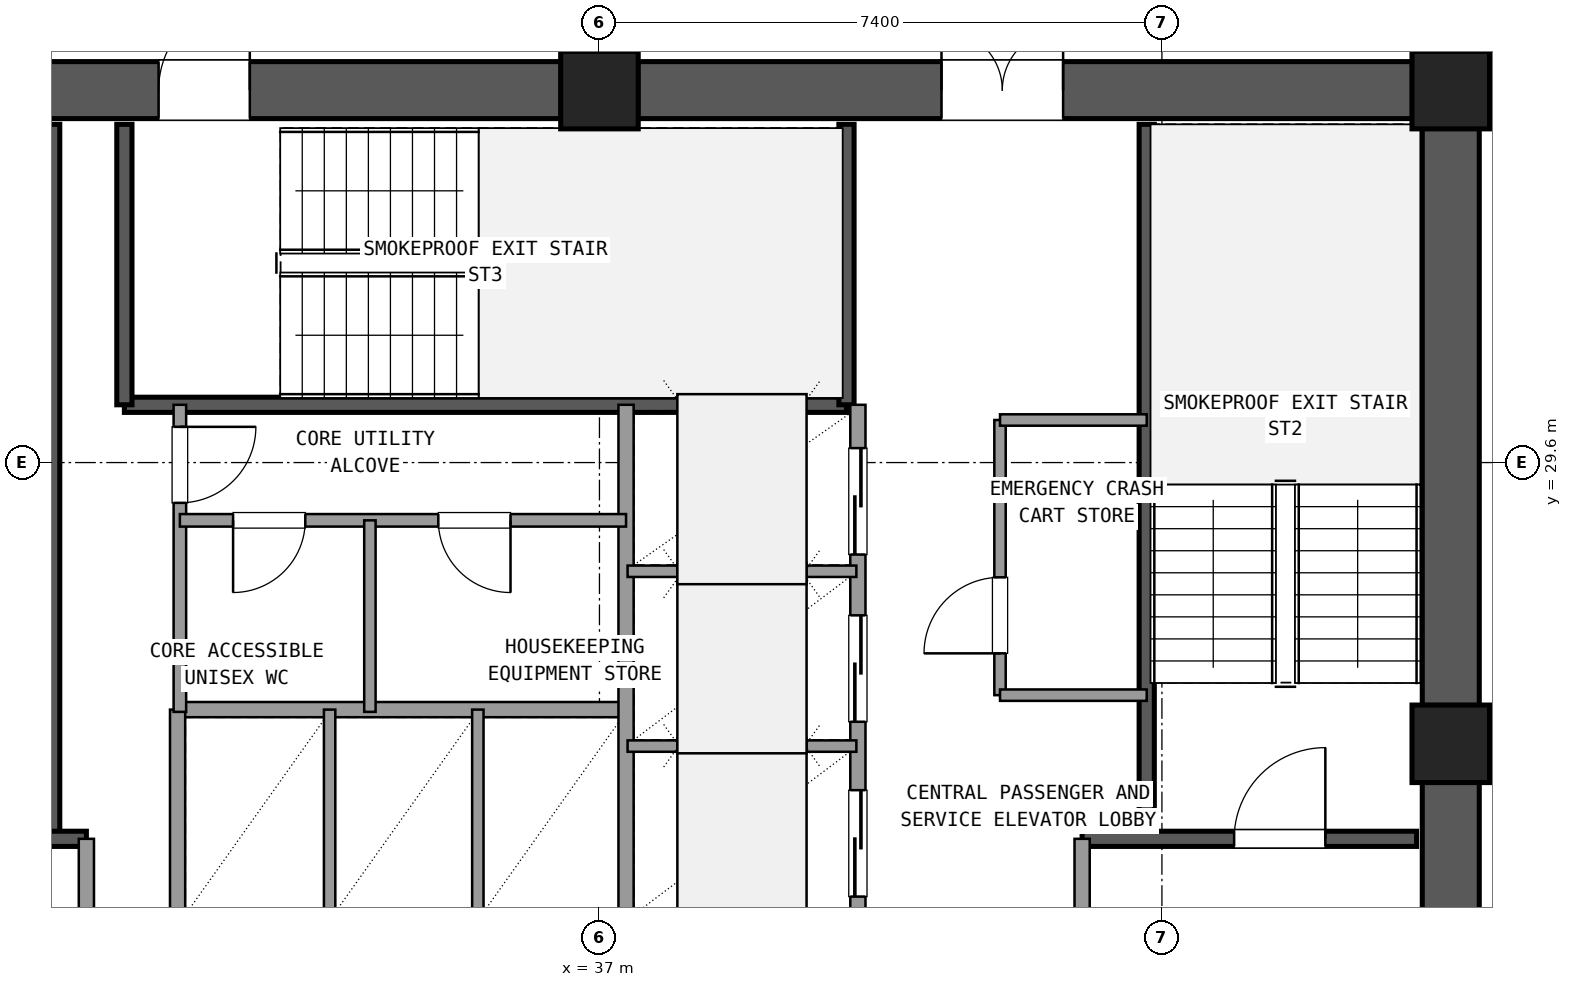
"""IFC4 building model, lengths in metres.
Left out: names, types, materials, properties, quantities, classifications, styles, units other than length and angle.
Written with IfcOpenShell. Run it as: python <this file> out.ifc"""

import sys

from ifc_helpers import new_model, si_unit, direction, frame, frame_2d, origin, origin_2d, place, context, subcontext, project, spatial, rectangle, extrude, element, fill, save


model = new_model("IFC4")
c1 = context("Model", 3, precision=1e-05, world=origin(), true_north=direction((0.0, 1.0)))
c2 = subcontext(c1, "Body", "Model", "MODEL_VIEW")
j1 = project(units=[si_unit("LENGTHUNIT", "METRE"), si_unit("PLANEANGLEUNIT", "RADIAN")], contexts=[c1])
p1 = place(None, origin())
s1 = spatial("IfcSite", under=j1, at=p1, CompositionType="ELEMENT")
p2 = place(p1, origin())
s2 = spatial("IfcBuilding", under=s1, at=p2, CompositionType="ELEMENT")
p3 = place(p2, frame((0.0, 0.0, 156.42)))
s3 = spatial("IfcBuildingStorey", under=s2, at=p3, CompositionType="ELEMENT", Elevation=156.42)
for number, where, z_axis, x_axis in (
    (1, (48.2, 25.9, 0.0), (0.0, 0.0, 1.0), (1.0, 0.0, 0.0)),
    (2, (48.2, 34.5, 0.0), (0.0, 0.0, 1.0), (1.0, 0.0, 0.0)),
    (3, (37.0, 34.5, 0.0), (0.0, 0.0, 1.0), (1.0, 0.0, 0.0)),
):
    element("IfcColumn", number, at=place(p3, frame(where, z_axis=z_axis, x_axis=x_axis)), inside=s3, PredefinedType="COLUMN", context=c2, shape_type="SweptSolid", body=[
        extrude(rectangle(XDim=1.02, YDim=1.02, at=origin_2d()), origin(), (0.0, 0.0, 1.0), 3.6),
    ])
p4 = place(p3, frame((48.2, 17.805, 0.0), z_axis=(0.0, 0.0, 1.0), x_axis=(0.0, 1.0, 0.0)))
e4 = element("IfcWall", 4, at=p4, inside=s3, PredefinedType="SHEAR", context=c2, shape_type="SweptSolid", body=[
    extrude(rectangle(XDim=7.59, YDim=0.75, at=frame_2d((3.795, 0.0))), origin(), (0.0, 0.0, 1.0), 3.32),
])
p5 = place(p4, frame((4.245, 0.0, 0.0)))
e5 = element("IfcOpeningElement", 5, at=p5, cuts=e4, PredefinedType="OPENING", context=c2, shape_type="SweptSolid", body=[
    extrude(rectangle(XDim=1.2, YDim=2.15, at=frame_2d((0.6, 1.075))), frame((0.0, 0.385, 0.0), z_axis=(0.0, -1.0, 0.0), x_axis=(1.0, 0.0, 0.0)), (0.0, 0.0, 1.0), 0.77),
])
p6 = place(p3, frame((48.2, 26.405, 0.0), z_axis=(0.0, 0.0, 1.0), x_axis=(0.0, 1.0, 0.0)))
e6 = element("IfcWall", 6, at=p6, inside=s3, PredefinedType="SHEAR", context=c2, shape_type="SweptSolid", body=[
    extrude(rectangle(XDim=7.59, YDim=0.75, at=frame_2d((3.795, 0.0))), origin(), (0.0, 0.0, 1.0), 3.32),
])
p7 = place(p3, frame((47.695, 34.5, 0.0), z_axis=(0.0, 0.0, 1.0), x_axis=(-1.0, 0.0, 0.0)))
e7 = element("IfcWall", 7, at=p7, inside=s3, PredefinedType="SHEAR", context=c2, shape_type="SweptSolid", body=[
    extrude(rectangle(XDim=10.19, YDim=0.75, at=frame_2d((5.095, 0.0))), origin(), (0.0, 0.0, 1.0), 3.32),
])
p8 = place(p7, frame((4.595, 0.0, 0.0)))
e8 = element("IfcOpeningElement", 8, at=p8, cuts=e7, PredefinedType="OPENING", context=c2, shape_type="SweptSolid", body=[
    extrude(rectangle(XDim=1.6, YDim=2.2, at=frame_2d((0.8, 1.1))), frame((0.0, 0.385, 0.0), z_axis=(0.0, -1.0, 0.0), x_axis=(1.0, 0.0, 0.0)), (0.0, 0.0, 1.0), 0.77),
])
p9 = place(p3, frame((36.495, 34.5, 0.0), z_axis=(0.0, 0.0, 1.0), x_axis=(-1.0, 0.0, 0.0)))
e9 = element("IfcWall", 9, at=p9, inside=s3, PredefinedType="SHEAR", context=c2, shape_type="SweptSolid", body=[
    extrude(rectangle(XDim=10.19, YDim=0.75, at=frame_2d((5.095, 0.0))), origin(), (0.0, 0.0, 1.0), 3.32),
])
p10 = place(p9, frame((4.095, 0.0, 0.0)))
e10 = element("IfcOpeningElement", 10, at=p10, cuts=e9, PredefinedType="OPENING", context=c2, shape_type="SweptSolid", body=[
    extrude(rectangle(XDim=1.2, YDim=2.15, at=frame_2d((0.6, 1.075))), frame((0.0, 0.385, 0.0), z_axis=(0.0, -1.0, 0.0), x_axis=(1.0, 0.0, 0.0)), (0.0, 0.0, 1.0), 0.77),
])
p11 = place(p3, frame((29.8, 24.65, 0.0), z_axis=(0.0, 0.0, 1.0), x_axis=(0.0, 1.0, 0.0)))
e11 = element("IfcWall", 11, at=p11, inside=s3, PredefinedType="SHEAR", context=c2, shape_type="SweptSolid", body=[
    extrude(rectangle(XDim=9.4, YDim=0.2, at=frame_2d((4.7, 0.0))), origin(), (0.0, 0.0, 1.0), 3.32),
])
p12 = place(p3, frame((26.25, 24.65, 0.0), z_axis=(0.0, 0.0, 1.0), x_axis=(1.0, 0.0, 0.0)))
e12 = element("IfcWall", 12, at=p12, inside=s3, PredefinedType="SHEAR", context=c2, shape_type="SweptSolid", body=[
    extrude(rectangle(XDim=4.0, YDim=0.2, at=frame_2d((2.0, 0.0))), origin(), (0.0, 0.0, 1.0), 3.32),
])
p13 = place(p12, frame((1.0, 0.0, 0.0)))
e13 = element("IfcOpeningElement", 13, at=p13, cuts=e12, PredefinedType="OPENING", context=c2, shape_type="SweptSolid", body=[
    extrude(rectangle(XDim=1.2, YDim=2.15, at=frame_2d((0.6, 1.075))), frame((0.0, 0.11, 0.0), z_axis=(0.0, -1.0, 0.0), x_axis=(1.0, 0.0, 0.0)), (0.0, 0.0, 1.0), 0.22),
])
p14 = place(p3, frame((44.2, 24.65, 0.0), z_axis=(0.0, 0.0, 1.0), x_axis=(0.0, 1.0, 0.0)))
e14 = element("IfcWall", 14, at=p14, inside=s3, PredefinedType="SHEAR", context=c2, shape_type="SweptSolid", body=[
    extrude(rectangle(XDim=9.4, YDim=0.2, at=frame_2d((4.7, 0.0))), origin(), (0.0, 0.0, 1.0), 3.32),
])
p15 = place(p3, frame((43.35, 24.65, 0.0), z_axis=(0.0, 0.0, 1.0), x_axis=(1.0, 0.0, 0.0)))
e15 = element("IfcWall", 15, at=p15, inside=s3, PredefinedType="SHEAR", context=c2, shape_type="SweptSolid", body=[
    extrude(rectangle(XDim=4.4, YDim=0.2, at=frame_2d((2.2, 0.0))), origin(), (0.0, 0.0, 1.0), 3.32),
])
p16 = place(p15, frame((2.0, 0.0, 0.0)))
e16 = element("IfcOpeningElement", 16, at=p16, cuts=e15, PredefinedType="OPENING", context=c2, shape_type="SweptSolid", body=[
    extrude(rectangle(XDim=1.2, YDim=2.15, at=frame_2d((0.6, 1.075))), frame((0.0, 0.11, 0.0), z_axis=(0.0, -1.0, 0.0), x_axis=(1.0, 0.0, 0.0)), (0.0, 0.0, 1.0), 0.22),
])
p17 = place(p3, frame((30.75, 30.36, 0.0), z_axis=(0.0, 0.0, 1.0), x_axis=(1.0, 0.0, 0.0)))
e17 = element("IfcWall", 17, at=p17, inside=s3, PredefinedType="SHEAR", context=c2, shape_type="SweptSolid", body=[
    extrude(rectangle(XDim=9.5, YDim=0.2, at=frame_2d((4.75, 0.0))), origin(), (0.0, 0.0, 1.0), 3.32),
])
for number, where, z_axis, x_axis in (
    (18, (30.75, 30.36, 0.0), (0.0, 0.0, 1.0), (0.0, 1.0, 0.0)),
    (19, (40.25, 30.36, 0.0), (0.0, 0.0, 1.0), (0.0, 1.0, 0.0)),
):
    element("IfcWall", number, at=place(p3, frame(where, z_axis=z_axis, x_axis=x_axis)), inside=s3, PredefinedType="SHEAR", context=c2, shape_type="SweptSolid", body=[
        extrude(rectangle(XDim=3.69, YDim=0.2, at=frame_2d((1.845, 0.0))), origin(), (0.0, 0.0, 1.0), 3.32),
    ])
p18 = place(p3, frame((30.25, 17.75, 0.0), z_axis=(0.0, 0.0, 1.0), x_axis=(0.0, 1.0, 0.0)))
e20 = element("IfcWall", 20, at=p18, inside=s3, PredefinedType="SOLIDWALL", context=c2, shape_type="SweptSolid", body=[
    extrude(rectangle(XDim=6.9, YDim=0.2, at=frame_2d((3.45, 0.0))), origin(), (0.0, 0.0, 1.0), 2.61),
])
p19 = place(p18, frame((4.15, 0.0, 0.0)))
e21 = element("IfcOpeningElement", 21, at=p19, cuts=e20, PredefinedType="OPENING", context=c2, shape_type="SweptSolid", body=[
    extrude(rectangle(XDim=1.2, YDim=2.15, at=frame_2d((0.6, 1.075))), frame((0.0, 0.11, 0.0), z_axis=(0.0, -1.0, 0.0), x_axis=(1.0, 0.0, 0.0)), (0.0, 0.0, 1.0), 0.22),
])
p20 = place(p3, frame((43.35, 17.75, 0.0), z_axis=(0.0, 0.0, 1.0), x_axis=(0.0, 1.0, 0.0)))
e22 = element("IfcWall", 22, at=p20, inside=s3, PredefinedType="SOLIDWALL", context=c2, shape_type="SweptSolid", body=[
    extrude(rectangle(XDim=6.9, YDim=0.2, at=frame_2d((3.45, 0.0))), origin(), (0.0, 0.0, 1.0), 2.61),
])
p21 = place(p20, frame((4.15, 0.0, 0.0)))
e23 = element("IfcOpeningElement", 23, at=p21, cuts=e22, PredefinedType="OPENING", context=c2, shape_type="SweptSolid", body=[
    extrude(rectangle(XDim=1.2, YDim=2.15, at=frame_2d((0.6, 1.075))), frame((0.0, 0.11, 0.0), z_axis=(0.0, -1.0, 0.0), x_axis=(1.0, 0.0, 0.0)), (0.0, 0.0, 1.0), 0.22),
])
p22 = place(p3, frame((31.45, 26.35, 0.0), z_axis=(0.0, 0.0, 1.0), x_axis=(1.0, 0.0, 0.0)))
e24 = element("IfcWall", 24, at=p22, inside=s3, PredefinedType="SOLIDWALL", context=c2, shape_type="SweptSolid", body=[
    extrude(rectangle(XDim=5.9, YDim=0.2, at=frame_2d((2.95, 0.0))), origin(), (0.0, 0.0, 1.0), 2.61),
])
p23 = place(p3, frame((31.45, 23.54, 0.0), z_axis=(0.0, 0.0, 1.0), x_axis=(0.0, 1.0, 0.0)))
e25 = element("IfcWall", 25, at=p23, inside=s3, PredefinedType="SOLIDWALL", context=c2, shape_type="SweptSolid", body=[
    extrude(rectangle(XDim=2.81, YDim=0.2, at=frame_2d((1.405, 0.0))), origin(), (0.0, 0.0, 1.0), 2.61),
])
for number, where, z_axis, x_axis in (
    (26, (33.45, 23.54, 0.0), (0.0, 0.0, 1.0), (0.0, 1.0, 0.0)),
    (27, (35.4, 23.54, 0.0), (0.0, 0.0, 1.0), (0.0, 1.0, 0.0)),
):
    element("IfcWall", number, at=place(p3, frame(where, z_axis=z_axis, x_axis=x_axis)), inside=s3, PredefinedType="PARTITIONING", context=c2, shape_type="SweptSolid", body=[
        extrude(rectangle(XDim=2.81, YDim=0.15, at=frame_2d((1.405, 0.0))), origin(), (0.0, 0.0, 1.0), 2.61),
    ])
p24 = place(p3, frame((37.35, 23.54, 0.0), z_axis=(0.0, 0.0, 1.0), x_axis=(0.0, 1.0, 0.0)))
e28 = element("IfcWall", 28, at=p24, inside=s3, PredefinedType="SOLIDWALL", context=c2, shape_type="SweptSolid", body=[
    extrude(rectangle(XDim=6.82, YDim=0.2, at=frame_2d((3.41, 0.0))), origin(), (0.0, 0.0, 1.0), 2.61),
])
p25 = place(p3, frame((40.4, 23.54, 0.0), z_axis=(0.0, 0.0, 1.0), x_axis=(0.0, 1.0, 0.0)))
e29 = element("IfcWall", 29, at=p25, inside=s3, PredefinedType="SOLIDWALL", context=c2, shape_type="SweptSolid", body=[
    extrude(rectangle(XDim=6.82, YDim=0.2, at=frame_2d((3.41, 0.0))), origin(), (0.0, 0.0, 1.0), 2.61),
])
p26 = place(p25, frame((0.35, 0.0, 0.0)))
e30 = element("IfcOpeningElement", 30, at=p26, cuts=e29, PredefinedType="OPENING", context=c2, shape_type="SweptSolid", body=[
    extrude(rectangle(XDim=1.4, YDim=2.2, at=frame_2d((0.7, 1.1))), frame((0.0, 0.11, 0.0), z_axis=(0.0, -1.0, 0.0), x_axis=(1.0, 0.0, 0.0)), (0.0, 0.0, 1.0), 0.22),
])
p27 = place(p25, frame((2.65, 0.0, 0.0)))
e31 = element("IfcOpeningElement", 31, at=p27, cuts=e29, PredefinedType="OPENING", context=c2, shape_type="SweptSolid", body=[
    extrude(rectangle(XDim=1.4, YDim=2.2, at=frame_2d((0.7, 1.1))), frame((0.0, 0.11, 0.0), z_axis=(0.0, -1.0, 0.0), x_axis=(1.0, 0.0, 0.0)), (0.0, 0.0, 1.0), 0.22),
])
p28 = place(p25, frame((4.85, 0.0, 0.0)))
e32 = element("IfcOpeningElement", 32, at=p28, cuts=e29, PredefinedType="OPENING", context=c2, shape_type="SweptSolid", body=[
    extrude(rectangle(XDim=1.4, YDim=2.2, at=frame_2d((0.7, 1.1))), frame((0.0, 0.11, 0.0), z_axis=(0.0, -1.0, 0.0), x_axis=(1.0, 0.0, 0.0)), (0.0, 0.0, 1.0), 0.22),
])
for number, where, z_axis, x_axis in (
    (33, (37.37, 25.87, 0.0), (0.0, 0.0, 1.0), (1.0, 0.0, 0.0)),
    (34, (37.37, 28.17, 0.0), (0.0, 0.0, 1.0), (1.0, 0.0, 0.0)),
):
    element("IfcWall", number, at=place(p3, frame(where, z_axis=z_axis, x_axis=x_axis)), inside=s3, PredefinedType="PARTITIONING", context=c2, shape_type="SweptSolid", body=[
        extrude(rectangle(XDim=3.01, YDim=0.15, at=frame_2d((1.505, 0.0))), origin(), (0.0, 0.0, 1.0), 2.61),
    ])
p29 = place(p3, frame((42.27, 26.54, 0.0), z_axis=(0.0, 0.0, 1.0), x_axis=(0.0, 1.0, 0.0)))
e35 = element("IfcWall", 35, at=p29, inside=s3, PredefinedType="PARTITIONING", context=c2, shape_type="SweptSolid", body=[
    extrude(rectangle(XDim=3.62, YDim=0.15, at=frame_2d((1.81, 0.0))), origin(), (0.0, 0.0, 1.0), 2.61),
])
p30 = place(p29, frame((0.55, 0.0, 0.0)))
e36 = element("IfcOpeningElement", 36, at=p30, cuts=e35, PredefinedType="OPENING", context=c2, shape_type="SweptSolid", body=[
    extrude(rectangle(XDim=1.0, YDim=2.15, at=frame_2d((0.5, 1.075))), frame((0.0, 0.085, 0.0), z_axis=(0.0, -1.0, 0.0), x_axis=(1.0, 0.0, 0.0)), (0.0, 0.0, 1.0), 0.17),
])
for number, where, z_axis, x_axis in (
    (37, (42.27, 26.54, 0.0), (0.0, 0.0, 1.0), (1.0, 0.0, 0.0)),
    (38, (42.27, 30.16, 0.0), (0.0, 0.0, 1.0), (1.0, 0.0, 0.0)),
):
    element("IfcWall", number, at=place(p3, frame(where, z_axis=z_axis, x_axis=x_axis)), inside=s3, PredefinedType="PARTITIONING", context=c2, shape_type="SweptSolid", body=[
        extrude(rectangle(XDim=1.93, YDim=0.15, at=frame_2d((0.965, 0.0))), origin(), (0.0, 0.0, 1.0), 2.61),
    ])
p31 = place(p3, frame((31.48, 26.32, 0.0), z_axis=(0.0, 0.0, 1.0), x_axis=(0.0, 1.0, 0.0)))
e39 = element("IfcWall", 39, at=p31, inside=s3, PredefinedType="PLUMBINGWALL", context=c2, shape_type="SweptSolid", body=[
    extrude(rectangle(XDim=4.04, YDim=0.165, at=frame_2d((2.02, 0.0))), origin(), (0.0, 0.0, 1.0), 2.61),
])
p32 = place(p31, frame((2.75, 0.0, 0.0)))
e40 = element("IfcOpeningElement", 40, at=p32, cuts=e39, PredefinedType="OPENING", context=c2, shape_type="SweptSolid", body=[
    extrude(rectangle(XDim=1.0, YDim=2.15, at=frame_2d((0.5, 1.075))), frame((0.0, 0.093, 0.0), z_axis=(0.0, -1.0, 0.0), x_axis=(1.0, 0.0, 0.0)), (0.0, 0.0, 1.0), 0.185),
])
p33 = place(p3, frame((31.48, 28.84, 0.0), z_axis=(0.0, 0.0, 1.0), x_axis=(1.0, 0.0, 0.0)))
e41 = element("IfcWall", 41, at=p33, inside=s3, PredefinedType="PLUMBINGWALL", context=c2, shape_type="SweptSolid", body=[
    extrude(rectangle(XDim=5.87, YDim=0.165, at=frame_2d((2.935, 0.0))), origin(), (0.0, 0.0, 1.0), 2.61),
])
p34 = place(p33, frame((0.7, 0.0, 0.0)))
e42 = element("IfcOpeningElement", 42, at=p34, cuts=e41, PredefinedType="OPENING", context=c2, shape_type="SweptSolid", body=[
    extrude(rectangle(XDim=0.95, YDim=2.1, at=frame_2d((0.475, 1.05))), frame((0.0, 0.093, 0.0), z_axis=(0.0, -1.0, 0.0), x_axis=(1.0, 0.0, 0.0)), (0.0, 0.0, 1.0), 0.185),
])
p35 = place(p33, frame((3.4, 0.0, 0.0)))
e43 = element("IfcOpeningElement", 43, at=p35, cuts=e41, PredefinedType="OPENING", context=c2, shape_type="SweptSolid", body=[
    extrude(rectangle(XDim=0.95, YDim=2.1, at=frame_2d((0.475, 1.05))), frame((0.0, 0.093, 0.0), z_axis=(0.0, -1.0, 0.0), x_axis=(1.0, 0.0, 0.0)), (0.0, 0.0, 1.0), 0.185),
])
p36 = place(p3, frame((33.98, 26.32, 0.0), z_axis=(0.0, 0.0, 1.0), x_axis=(0.0, 1.0, 0.0)))
e44 = element("IfcWall", 44, at=p36, inside=s3, PredefinedType="PARTITIONING", context=c2, shape_type="SweptSolid", body=[
    extrude(rectangle(XDim=2.52, YDim=0.15, at=frame_2d((1.26, 0.0))), origin(), (0.0, 0.0, 1.0), 2.61),
])
p37 = place(p3, frame((37.0, 34.95, 0.0), z_axis=(0.0, 0.0, 1.0), x_axis=(0.0, 1.0, 0.0)))
e45 = element("IfcWall", 45, at=p37, inside=s3, PredefinedType="PARTITIONING", context=c2, shape_type="SweptSolid", body=[
    extrude(rectangle(XDim=3.21, YDim=0.18, at=frame_2d((1.605, 0.0))), origin(), (0.0, 0.0, 1.0), 2.61),
])
p38 = place(p37, frame((0.605, 0.0, 0.0)))
e46 = element("IfcOpeningElement", 46, at=p38, cuts=e45, PredefinedType="OPENING", context=c2, shape_type="SweptSolid", body=[
    extrude(rectangle(XDim=2.0, YDim=2.2, at=frame_2d((1.0, 1.1))), frame((0.0, 0.1, 0.0), z_axis=(0.0, -1.0, 0.0), x_axis=(1.0, 0.0, 0.0)), (0.0, 0.0, 1.0), 0.2),
])
p39 = place(p16, origin())
e47 = element("IfcDoor", 47, at=p39, inside=s3, OperationType="SINGLE_SWING_RIGHT", PredefinedType="DOOR", context=c2, shape_type="SweptSolid", body=[
    extrude(rectangle(XDim=1.2, YDim=2.15, at=frame_2d((0.6, 1.075))), frame((0.0, 0.025, 0.0), z_axis=(0.0, -1.0, 0.0), x_axis=(1.0, 0.0, 0.0)), (0.0, 0.0, 1.0), 0.05),
])
fill(e16, e47)
p40 = place(p8, frame((1.6, 0.0, 0.0), z_axis=(0.0, 0.0, 1.0), x_axis=(-1.0, 0.0, 0.0)))
e48 = element("IfcDoor", 48, at=p40, inside=s3, OperationType="DOUBLE_DOOR_SINGLE_SWING", PredefinedType="DOOR", context=c2, shape_type="SweptSolid", body=[
    extrude(rectangle(XDim=1.6, YDim=2.2, at=frame_2d((0.8, 1.1))), frame((0.0, 0.025, 0.0), z_axis=(0.0, -1.0, 0.0), x_axis=(1.0, 0.0, 0.0)), (0.0, 0.0, 1.0), 0.05),
])
fill(e8, e48)
p41 = place(p10, frame((1.2, 0.0, 0.0), z_axis=(0.0, 0.0, 1.0), x_axis=(-1.0, 0.0, 0.0)))
e49 = element("IfcDoor", 49, at=p41, inside=s3, OperationType="SINGLE_SWING_LEFT", PredefinedType="DOOR", context=c2, shape_type="SweptSolid", body=[
    extrude(rectangle(XDim=1.2, YDim=2.15, at=frame_2d((0.6, 1.075))), frame((0.0, 0.025, 0.0), z_axis=(0.0, -1.0, 0.0), x_axis=(1.0, 0.0, 0.0)), (0.0, 0.0, 1.0), 0.05),
])
fill(e10, e49)
p42 = place(p26, origin())
e50 = element("IfcDoor", 50, at=p42, inside=s3, OperationType="SLIDING_TO_LEFT", PredefinedType="DOOR", context=c2, shape_type="SweptSolid", body=[
    extrude(rectangle(XDim=1.4, YDim=2.2, at=frame_2d((0.7, 1.1))), frame((0.0, 0.025, 0.0), z_axis=(0.0, -1.0, 0.0), x_axis=(1.0, 0.0, 0.0)), (0.0, 0.0, 1.0), 0.05),
])
fill(e30, e50)
p43 = place(p27, origin())
e51 = element("IfcDoor", 51, at=p43, inside=s3, OperationType="SLIDING_TO_LEFT", PredefinedType="DOOR", context=c2, shape_type="SweptSolid", body=[
    extrude(rectangle(XDim=1.4, YDim=2.2, at=frame_2d((0.7, 1.1))), frame((0.0, 0.025, 0.0), z_axis=(0.0, -1.0, 0.0), x_axis=(1.0, 0.0, 0.0)), (0.0, 0.0, 1.0), 0.05),
])
fill(e31, e51)
p44 = place(p28, origin())
e52 = element("IfcDoor", 52, at=p44, inside=s3, OperationType="SLIDING_TO_RIGHT", PredefinedType="DOOR", context=c2, shape_type="SweptSolid", body=[
    extrude(rectangle(XDim=1.4, YDim=2.2, at=frame_2d((0.7, 1.1))), frame((0.0, 0.025, 0.0), z_axis=(0.0, -1.0, 0.0), x_axis=(1.0, 0.0, 0.0)), (0.0, 0.0, 1.0), 0.05),
])
fill(e32, e52)
p45 = place(p30, origin())
e53 = element("IfcDoor", 53, at=p45, inside=s3, OperationType="SINGLE_SWING_LEFT", PredefinedType="DOOR", context=c2, shape_type="SweptSolid", body=[
    extrude(rectangle(XDim=1.0, YDim=2.15, at=frame_2d((0.5, 1.075))), frame((0.0, 0.025, 0.0), z_axis=(0.0, -1.0, 0.0), x_axis=(1.0, 0.0, 0.0)), (0.0, 0.0, 1.0), 0.05),
])
fill(e36, e53)
p46 = place(p32, frame((1.0, 0.0, 0.0), z_axis=(0.0, 0.0, 1.0), x_axis=(-1.0, 0.0, 0.0)))
e54 = element("IfcDoor", 54, at=p46, inside=s3, OperationType="SINGLE_SWING_RIGHT", PredefinedType="DOOR", context=c2, shape_type="SweptSolid", body=[
    extrude(rectangle(XDim=1.0, YDim=2.15, at=frame_2d((0.5, 1.075))), frame((0.0, 0.025, 0.0), z_axis=(0.0, -1.0, 0.0), x_axis=(1.0, 0.0, 0.0)), (0.0, 0.0, 1.0), 0.05),
])
fill(e40, e54)
p47 = place(p34, frame((0.95, 0.0, 0.0), z_axis=(0.0, 0.0, 1.0), x_axis=(-1.0, 0.0, 0.0)))
e55 = element("IfcDoor", 55, at=p47, inside=s3, OperationType="SINGLE_SWING_LEFT", PredefinedType="DOOR", context=c2, shape_type="SweptSolid", body=[
    extrude(rectangle(XDim=0.95, YDim=2.1, at=frame_2d((0.475, 1.05))), frame((0.0, 0.025, 0.0), z_axis=(0.0, -1.0, 0.0), x_axis=(1.0, 0.0, 0.0)), (0.0, 0.0, 1.0), 0.05),
])
fill(e42, e55)
p48 = place(p35, frame((0.95, 0.0, 0.0), z_axis=(0.0, 0.0, 1.0), x_axis=(-1.0, 0.0, 0.0)))
e56 = element("IfcDoor", 56, at=p48, inside=s3, OperationType="SINGLE_SWING_RIGHT", PredefinedType="DOOR", context=c2, shape_type="SweptSolid", body=[
    extrude(rectangle(XDim=0.95, YDim=2.1, at=frame_2d((0.475, 1.05))), frame((0.0, 0.025, 0.0), z_axis=(0.0, -1.0, 0.0), x_axis=(1.0, 0.0, 0.0)), (0.0, 0.0, 1.0), 0.05),
])
fill(e43, e56)
save(model, sys.argv[1])
